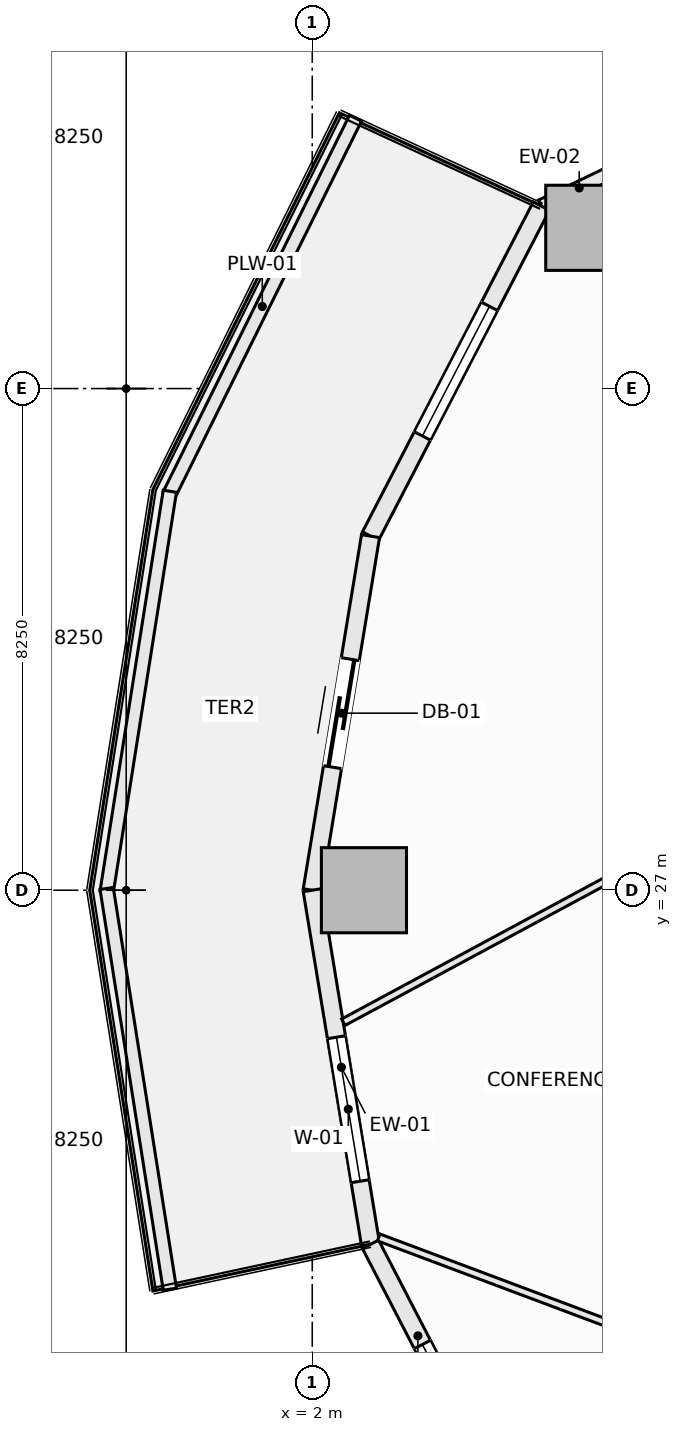
"""IFC4 building model, lengths in metres.
Left out: names, types, materials, properties, quantities, classifications, styles, units other than length and angle.
Written with IfcOpenShell. Run it as: python <this file> out.ifc"""

import sys

from ifc_helpers import new_model, si_unit, direction, frame, frame_2d, origin, origin_2d, place, context, subcontext, project, spatial, rectangle, extrude, element, fill, save


model = new_model("IFC4")
c1 = context("Model", 3, precision=1e-05, world=origin(), true_north=direction((0.0, 1.0)))
c2 = subcontext(c1, "Body", "Model", "MODEL_VIEW")
j1 = project(units=[si_unit("LENGTHUNIT", "METRE"), si_unit("PLANEANGLEUNIT", "RADIAN")], contexts=[c1])
p1 = place(None, origin())
s1 = spatial("IfcSite", under=j1, at=p1, CompositionType="ELEMENT")
p2 = place(p1, origin())
s2 = spatial("IfcBuilding", under=s1, at=p2, CompositionType="ELEMENT")
p3 = place(p2, frame((0.0, 0.0, 38.05)))
s3 = spatial("IfcBuildingStorey", under=s2, at=p3, CompositionType="ELEMENT", Elevation=38.05)
for number, where, z_axis, x_axis in (
    (1, (6.54, 37.894, -0.28), (0.0, 0.0, 1.0), (1.0, 0.0, 0.0)),
    (2, (2.85, 27.0, -0.28), (0.0, 0.0, 1.0), (1.0, 0.0, 0.0)),
):
    element("IfcColumn", number, at=place(p3, frame(where, z_axis=z_axis, x_axis=x_axis)), inside=s3, PredefinedType="COLUMN", context=c2, shape_type="SweptSolid", body=[
        extrude(rectangle(XDim=1.4, YDim=1.4, at=origin_2d()), origin(), (0.0, 0.0, 1.0), 3.85),
    ])
p4 = place(p3, frame((5.768, 38.25, 0.0), z_axis=(0.0, 0.0, 1.0), x_axis=(0.90131879969, 0.433156347438, 0.0)))
e3 = element("IfcWall", 3, at=p4, inside=s3, PredefinedType="SOLIDWALL", context=c2, shape_type="SweptSolid", body=[
    extrude(rectangle(XDim=1.381, YDim=0.22, at=frame_2d((0.69, 0.0))), origin(), (0.0, 0.0, 1.0), 3.093),
])
p5 = place(p3, frame((2.958, 32.823, 0.0), z_axis=(0.0, 0.0, 1.0), x_axis=(0.459809804413, 0.88801742312, 0.0)))
e4 = element("IfcWall", 4, at=p5, inside=s3, PredefinedType="SOLIDWALL", context=c2, shape_type="SweptSolid", body=[
    extrude(rectangle(XDim=6.111, YDim=0.3, at=frame_2d((3.055, 0.0))), origin(), (0.0, 0.0, 1.0), 3.093),
])
p6 = place(p5, frame((1.855, 0.0, 0.85)))
e5 = element("IfcOpeningElement", 5, at=p6, cuts=e4, PredefinedType="OPENING", context=c2, shape_type="SweptSolid", body=[
    extrude(rectangle(XDim=2.4, YDim=1.9, at=frame_2d((1.2, 0.95))), frame((0.0, 0.16, 0.0), z_axis=(0.0, -1.0, 0.0), x_axis=(1.0, 0.0, 0.0)), (0.0, 0.0, 1.0), 0.32),
])
p7 = place(p3, frame((2.0, 27.0, 0.0), z_axis=(0.0, 0.0, 1.0), x_axis=(0.162366057843, 0.98673059305, 0.0)))
e6 = element("IfcWall", 6, at=p7, inside=s3, PredefinedType="SOLIDWALL", context=c2, shape_type="SweptSolid", body=[
    extrude(rectangle(XDim=5.902, YDim=0.3, at=frame_2d((2.951, 0.0))), origin(), (0.0, 0.0, 1.0), 3.093),
])
p8 = place(p7, frame((2.051, 0.0, 0.0)))
e7 = element("IfcOpeningElement", 7, at=p8, cuts=e6, PredefinedType="OPENING", context=c2, shape_type="SweptSolid", body=[
    extrude(rectangle(XDim=1.8, YDim=2.25, at=frame_2d((0.9, 1.125))), frame((0.0, 0.16, 0.0), z_axis=(0.0, -1.0, 0.0), x_axis=(1.0, 0.0, 0.0)), (0.0, 0.0, 1.0), 0.32),
])
p9 = place(p3, frame((2.0, 27.0, 0.0), z_axis=(0.0, 0.0, 1.0), x_axis=(0.162366057843, -0.98673059305, 0.0)))
e8 = element("IfcWall", 8, at=p9, inside=s3, PredefinedType="SOLIDWALL", context=c2, shape_type="SweptSolid", body=[
    extrude(rectangle(XDim=5.902, YDim=0.3, at=frame_2d((2.951, 0.0))), origin(), (0.0, 0.0, 1.0), 3.093),
])
p10 = place(p9, frame((2.45, 0.0, 0.85)))
e9 = element("IfcOpeningElement", 9, at=p10, cuts=e8, PredefinedType="OPENING", context=c2, shape_type="SweptSolid", body=[
    extrude(rectangle(XDim=2.4, YDim=1.9, at=frame_2d((1.2, 0.95))), frame((0.0, 0.16, 0.0), z_axis=(0.0, -1.0, 0.0), x_axis=(1.0, 0.0, 0.0)), (0.0, 0.0, 1.0), 0.32),
])
p11 = place(p3, frame((2.958, 21.177, 0.0), z_axis=(0.0, 0.0, 1.0), x_axis=(0.459809804413, -0.88801742312, 0.0)))
e10 = element("IfcWall", 10, at=p11, inside=s3, PredefinedType="SOLIDWALL", context=c2, shape_type="SweptSolid", body=[
    extrude(rectangle(XDim=6.111, YDim=0.3, at=frame_2d((3.055, 0.0))), origin(), (0.0, 0.0, 1.0), 3.093),
])
p12 = place(p11, frame((1.855, 0.0, 0.85)))
e11 = element("IfcOpeningElement", 11, at=p12, cuts=e10, PredefinedType="OPENING", context=c2, shape_type="SweptSolid", body=[
    extrude(rectangle(XDim=2.4, YDim=1.9, at=frame_2d((1.2, 0.95))), frame((0.0, 0.16, 0.0), z_axis=(0.0, -1.0, 0.0), x_axis=(1.0, 0.0, 0.0)), (0.0, 0.0, 1.0), 0.32),
])
p13 = place(p3, frame((-0.354, 33.502, 0.0), z_axis=(0.0, 0.0, 1.0), x_axis=(0.443578479433, 0.8962355341, 0.0)))
e12 = element("IfcWall", 12, at=p13, inside=s3, PredefinedType="PARAPET", context=c2, shape_type="SweptSolid", body=[
    extrude(rectangle(XDim=6.911, YDim=0.22, at=frame_2d((3.456, 0.0))), origin(), (0.0, 0.0, 1.0), 0.52),
])
for number, where, z_axis, x_axis in (
    (13, (-1.382, 26.971, 0.0), (0.0, 0.0, 1.0), (0.156, 0.988, 0.0)),
    (14, (-1.382, 27.029, 0.0), (0.0, 0.0, 1.0), (0.156, -0.988, 0.0)),
):
    element("IfcWall", number, at=place(p3, frame(where, z_axis=z_axis, x_axis=x_axis)), inside=s3, PredefinedType="PARAPET", context=c2, shape_type="SweptSolid", body=[
        extrude(rectangle(XDim=6.672, YDim=0.22, at=frame_2d((3.336, 0.0))), origin(), (0.0, 0.0, 1.0), 0.52),
    ])
p14 = place(p3, frame((2.511, 24.829, 0.0), z_axis=(0.0, 0.0, 1.0), x_axis=(0.880496447335, 0.474052746253, 0.0)))
e15 = element("IfcWall", 15, at=p14, inside=s3, PredefinedType="PARTITIONING", context=c2, shape_type="SweptSolid", body=[
    extrude(rectangle(XDim=12.989, YDim=0.12, at=frame_2d((6.495, 0.0))), origin(), (0.0, 0.0, 1.0), 2.934),
])
p15 = place(p3, frame((3.094, 21.29, 0.0), z_axis=(0.0, 0.0, 1.0), x_axis=(0.936344026666, -0.35108384145, 0.0)))
e16 = element("IfcWall", 16, at=p15, inside=s3, PredefinedType="PARTITIONING", context=c2, shape_type="SweptSolid", body=[
    extrude(rectangle(XDim=21.62, YDim=0.12, at=frame_2d((10.81, 0.0))), origin(), (0.0, 0.0, 1.0), 3.57),
])
p16 = place(p6, origin())
e17 = element("IfcWindow", 17, at=p16, inside=s3, PartitioningType="SINGLE_PANEL", PredefinedType="WINDOW", context=c2, shape_type="SweptSolid", body=[
    extrude(rectangle(XDim=2.4, YDim=1.9, at=frame_2d((1.2, 0.95))), frame((0.0, 0.03, 0.0), z_axis=(0.0, -1.0, 0.0), x_axis=(1.0, 0.0, 0.0)), (0.0, 0.0, 1.0), 0.06),
])
fill(e5, e17)
p17 = place(p8, origin())
e18 = element("IfcDoor", 18, at=p17, inside=s3, OperationType="SLIDING_TO_LEFT", PredefinedType="DOOR", context=c2, shape_type="SweptSolid", body=[
    extrude(rectangle(XDim=1.8, YDim=2.25, at=frame_2d((0.9, 1.125))), frame((0.0, 0.025, 0.0), z_axis=(0.0, -1.0, 0.0), x_axis=(1.0, 0.0, 0.0)), (0.0, 0.0, 1.0), 0.05),
])
fill(e7, e18)
p18 = place(p10, origin())
e19 = element("IfcWindow", 19, at=p18, inside=s3, PartitioningType="SINGLE_PANEL", PredefinedType="WINDOW", context=c2, shape_type="SweptSolid", body=[
    extrude(rectangle(XDim=2.4, YDim=1.9, at=frame_2d((1.2, 0.95))), frame((0.0, 0.03, 0.0), z_axis=(0.0, -1.0, 0.0), x_axis=(1.0, 0.0, 0.0)), (0.0, 0.0, 1.0), 0.06),
])
fill(e9, e19)
p19 = place(p12, origin())
e20 = element("IfcWindow", 20, at=p19, inside=s3, PartitioningType="SINGLE_PANEL", PredefinedType="WINDOW", context=c2, shape_type="SweptSolid", body=[
    extrude(rectangle(XDim=2.4, YDim=1.9, at=frame_2d((1.2, 0.95))), frame((0.0, 0.03, 0.0), z_axis=(0.0, -1.0, 0.0), x_axis=(1.0, 0.0, 0.0)), (0.0, 0.0, 1.0), 0.06),
])
fill(e11, e20)
save(model, sys.argv[1])
